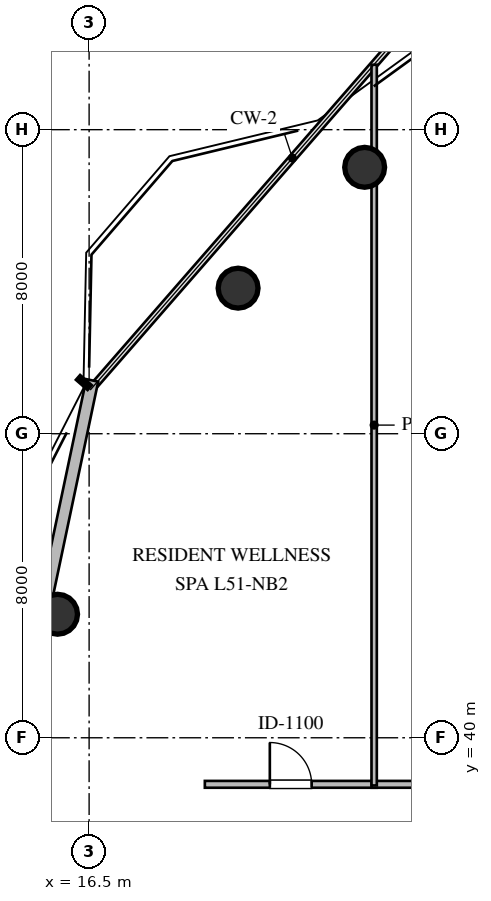
"""IFC4 building model, lengths in metres.
Left out: names, types, materials, properties, quantities, classifications, styles, units other than length and angle.
Written with IfcOpenShell. Run it as: python <this file> out.ifc"""

import sys

from ifc_helpers import new_model, si_unit, direction, frame, frame_2d, origin, origin_2d, place, context, subcontext, project, spatial, rectangle, circle, extrude, element, fill, save


model = new_model("IFC4")
c1 = context("Model", 3, precision=1e-05, world=origin(), true_north=direction((0.0, 1.0)))
c2 = subcontext(c1, "Body", "Model", "MODEL_VIEW")
j1 = project(units=[si_unit("LENGTHUNIT", "METRE"), si_unit("PLANEANGLEUNIT", "RADIAN")], contexts=[c1])
p1 = place(None, origin())
s1 = spatial("IfcSite", under=j1, at=p1, CompositionType="ELEMENT")
p2 = place(p1, origin())
s2 = spatial("IfcBuilding", under=s1, at=p2, CompositionType="ELEMENT")
p3 = place(p2, frame((0.0, 0.0, 195.6)))
s3 = spatial("IfcBuildingStorey", under=s2, at=p3, CompositionType="ELEMENT", Elevation=195.6)
for number, where, z_axis, x_axis in (
    (1, (23.75, 55.01, 0.0), (0.0, 0.0, 1.0), (1.0, 0.0, 0.0)),
    (2, (20.42, 51.83, 0.0), (0.0, 0.0, 1.0), (1.0, 0.0, 0.0)),
    (3, (15.67, 43.25, 0.0), (0.0, 0.0, 1.0), (1.0, 0.0, 0.0)),
):
    element("IfcColumn", number, at=place(p3, frame(where, z_axis=z_axis, x_axis=x_axis)), inside=s3, PredefinedType="COLUMN", context=c2, shape_type="SweptSolid", body=[
        extrude(circle(Radius=0.525, at=origin_2d()), origin(), (0.0, 0.0, 1.0), 3.6),
    ])
p4 = place(p3, frame((13.525, 34.903, 0.0), z_axis=(0.0, 0.0, 1.0), x_axis=(0.206301080321, 0.978488561128, 0.0)))
e4 = element("IfcWall", 4, at=p4, inside=s3, PredefinedType="STANDARD", context=c2, shape_type="SweptSolid", body=[
    extrude(rectangle(XDim=14.819, YDim=0.32, at=frame_2d((7.409, 0.0))), origin(), (0.0, 0.0, 1.0), 2.817),
])
p5 = place(p3, frame((19.545, 38.775, 0.0), z_axis=(0.0, 0.0, 1.0), x_axis=(1.0, 0.0, 0.0)))
e5 = element("IfcWall", 5, at=p5, inside=s3, PredefinedType="PARTITIONING", context=c2, shape_type="SweptSolid", body=[
    extrude(rectangle(XDim=4.52, YDim=0.18, at=frame_2d((2.26, 0.0))), origin(), (0.0, 0.0, 1.0), 3.36),
])
p6 = place(p5, frame((1.71, 0.0, 0.0)))
e6 = element("IfcOpeningElement", 6, at=p6, cuts=e5, PredefinedType="OPENING", context=c2, shape_type="SweptSolid", body=[
    extrude(rectangle(XDim=1.1, YDim=2.1, at=frame_2d((0.55, 1.05))), frame((0.0, 0.1, 0.0), z_axis=(0.0, -1.0, 0.0), x_axis=(1.0, 0.0, 0.0)), (0.0, 0.0, 1.0), 0.2),
])
p7 = place(p3, frame((23.935, 38.775, 0.0), z_axis=(0.0, 0.0, 1.0), x_axis=(1.0, 0.0, 0.0)))
e7 = element("IfcWall", 7, at=p7, inside=s3, PredefinedType="PARTITIONING", context=c2, shape_type="SweptSolid", body=[
    extrude(rectangle(XDim=3.88, YDim=0.18, at=frame_2d((1.94, 0.0))), origin(), (0.0, 0.0, 1.0), 3.36),
])
p8 = place(p7, frame((1.39, 0.0, 0.0)))
e8 = element("IfcOpeningElement", 8, at=p8, cuts=e7, PredefinedType="OPENING", context=c2, shape_type="SweptSolid", body=[
    extrude(rectangle(XDim=1.1, YDim=2.1, at=frame_2d((0.55, 1.05))), frame((0.0, 0.1, 0.0), z_axis=(0.0, -1.0, 0.0), x_axis=(1.0, 0.0, 0.0)), (0.0, 0.0, 1.0), 0.2),
])
p9 = place(p3, frame((24.0, 57.709, 0.0), z_axis=(0.0, 0.0, 1.0), x_axis=(0.0, -1.0, 0.0)))
e9 = element("IfcWall", 9, at=p9, inside=s3, PredefinedType="PARTITIONING", context=c2, shape_type="SweptSolid", body=[
    extrude(rectangle(XDim=18.964, YDim=0.14, at=frame_2d((9.482, 0.0))), origin(), (0.0, 0.0, 1.0), 2.89),
])
p10 = place(p6, origin())
e10 = element("IfcDoor", 10, at=p10, inside=s3, OperationType="SINGLE_SWING_LEFT", PredefinedType="DOOR", context=c2, shape_type="SweptSolid", body=[
    extrude(rectangle(XDim=1.1, YDim=2.1, at=frame_2d((0.55, 1.05))), frame((0.0, 0.025, 0.0), z_axis=(0.0, -1.0, 0.0), x_axis=(1.0, 0.0, 0.0)), (0.0, 0.0, 1.0), 0.05),
])
fill(e6, e10)
save(model, sys.argv[1])
